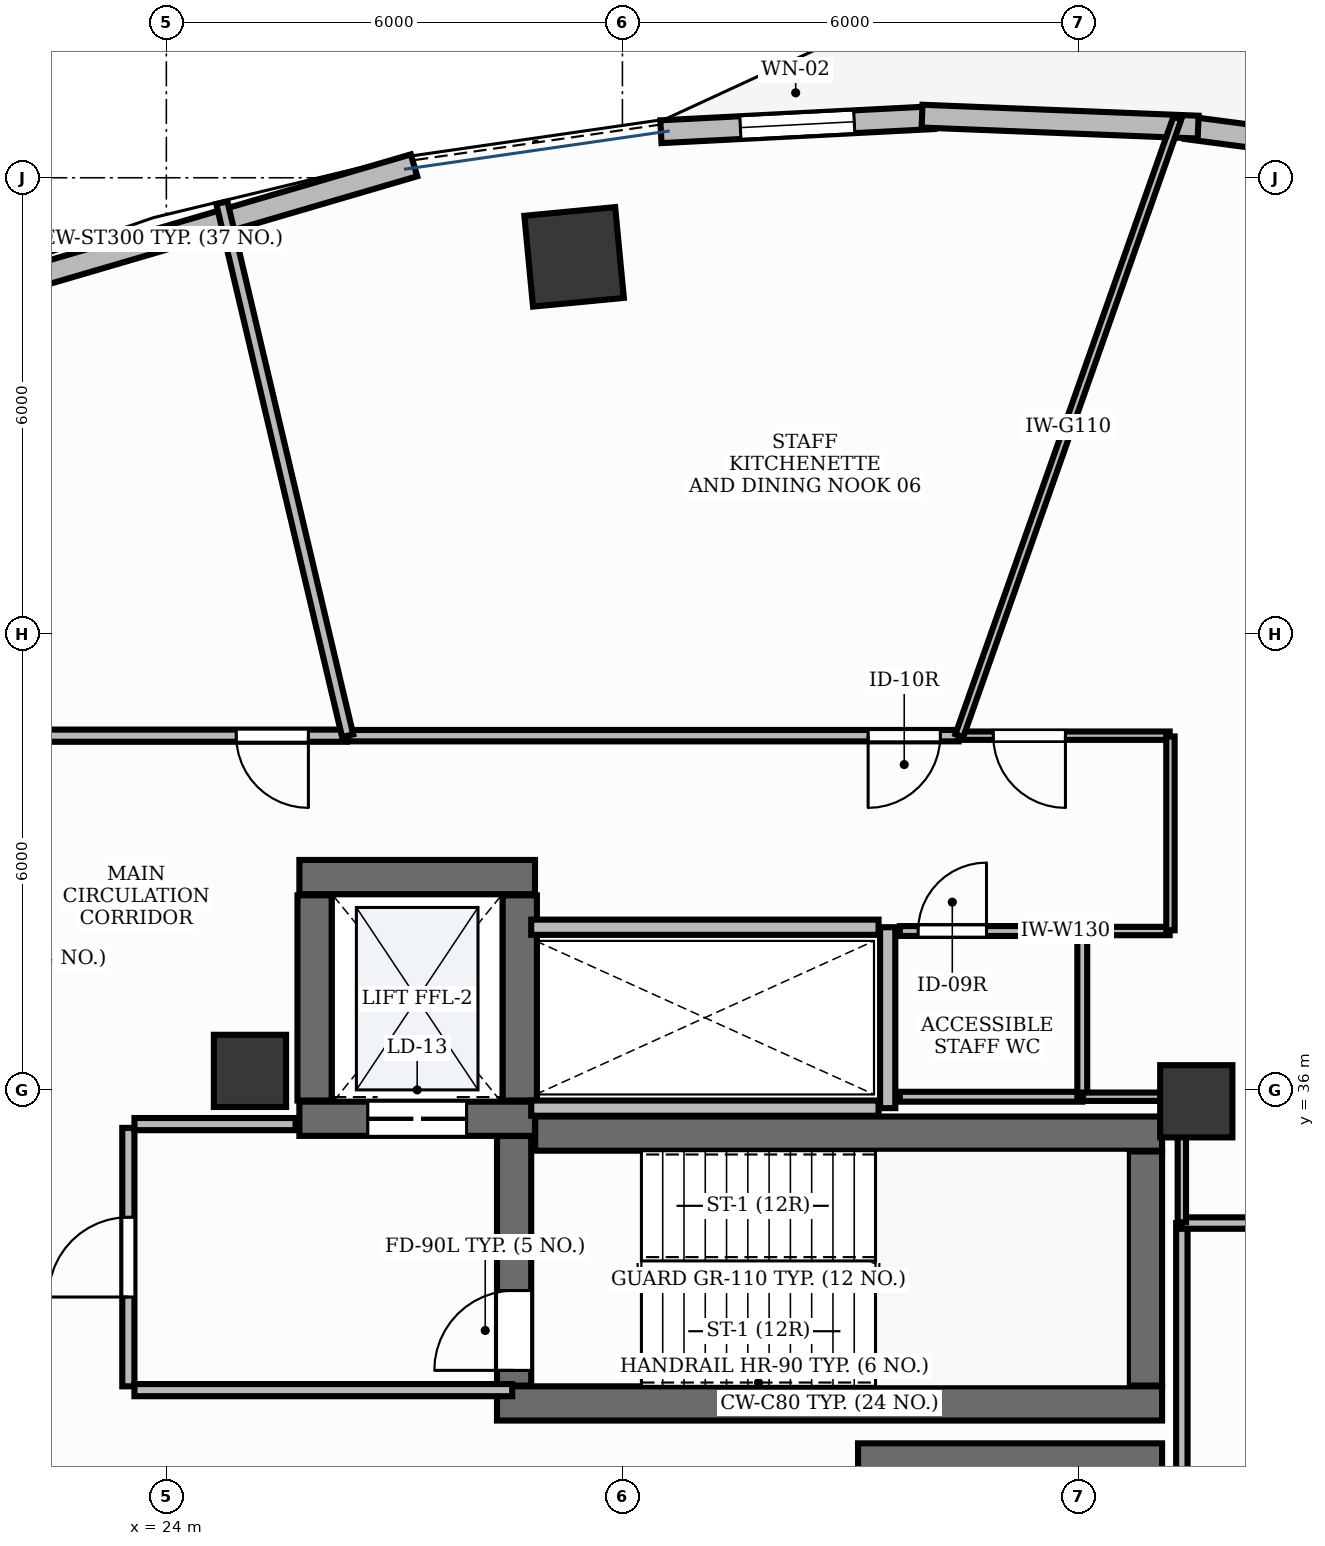
"""IFC4 building model, lengths in metres.
Left out: names, types, materials, properties, quantities, classifications, styles, units other than length and angle.
Written with IfcOpenShell. Run it as: python <this file> out.ifc"""

import sys

from ifc_helpers import new_model, si_unit, direction, frame, frame_2d, origin, origin_2d, place, context, subcontext, project, spatial, rectangle, extrude, element, fill, save


model = new_model("IFC4")
c1 = context("Model", 3, precision=1e-05, world=origin(), true_north=direction((0.0, 1.0)))
c2 = subcontext(c1, "Body", "Model", "MODEL_VIEW")
j1 = project(units=[si_unit("LENGTHUNIT", "METRE"), si_unit("PLANEANGLEUNIT", "RADIAN")], contexts=[c1])
p1 = place(None, origin())
s1 = spatial("IfcSite", under=j1, at=p1, CompositionType="ELEMENT")
p2 = place(p1, origin())
s2 = spatial("IfcBuilding", under=s1, at=p2, CompositionType="ELEMENT")
p3 = place(p2, frame((0.0, 0.0, 132.0)))
s3 = spatial("IfcBuildingStorey", under=s2, at=p3, CompositionType="ELEMENT", Elevation=132.0)
p4 = place(p3, frame((28.852, 35.425, 0.0), z_axis=(0.0, 0.0, 1.0), x_axis=(1.0, 0.0, 0.0)))
e1 = element("IfcWall", 1, at=p4, inside=s3, PredefinedType="SHEAR", context=c2, shape_type="SweptSolid", body=[
    extrude(rectangle(XDim=8.248, YDim=0.45, at=frame_2d((4.124, 0.0))), origin(), (0.0, 0.0, 1.0), 3.9),
])
p5 = place(p3, frame((28.35, 31.875, 0.0), z_axis=(0.0, 0.0, 1.0), x_axis=(1.0, 0.0, 0.0)))
e2 = element("IfcWall", 2, at=p5, inside=s3, PredefinedType="SHEAR", context=c2, shape_type="SweptSolid", body=[
    extrude(rectangle(XDim=8.75, YDim=0.45, at=frame_2d((4.375, 0.0))), origin(), (0.0, 0.0, 1.0), 3.9),
])
p6 = place(p3, frame((36.875, 32.11, 0.0), z_axis=(0.0, 0.0, 1.0), x_axis=(0.0, 1.0, 0.0)))
e3 = element("IfcWall", 3, at=p6, inside=s3, PredefinedType="SHEAR", context=c2, shape_type="SweptSolid", body=[
    extrude(rectangle(XDim=3.08, YDim=0.45, at=frame_2d((1.54, 0.0))), origin(), (0.0, 0.0, 1.0), 3.9),
])
p7 = place(p3, frame((28.575, 32.11, 0.0), z_axis=(0.0, 0.0, 1.0), x_axis=(0.0, 1.0, 0.0)))
e4 = element("IfcWall", 4, at=p7, inside=s3, PredefinedType="SHEAR", context=c2, shape_type="SweptSolid", body=[
    extrude(rectangle(XDim=3.283, YDim=0.45, at=frame_2d((1.642, 0.0))), origin(), (0.0, 0.0, 1.0), 3.9),
])
p8 = place(p7, frame((0.2, 0.0, 0.0)))
e5 = element("IfcOpeningElement", 5, at=p8, cuts=e4, PredefinedType="OPENING", context=c2, shape_type="SweptSolid", body=[
    extrude(rectangle(XDim=1.05, YDim=2.15, at=frame_2d((0.525, 1.075))), frame((0.0, 0.24, 0.0), z_axis=(0.0, -1.0, 0.0), x_axis=(1.0, 0.0, 0.0)), (0.0, 0.0, 1.0), 0.48),
])
p9 = place(p3, frame((33.1, 31.125, 0.0), z_axis=(0.0, 0.0, 1.0), x_axis=(1.0, 0.0, 0.0)))
e6 = element("IfcWall", 6, at=p9, inside=s3, PredefinedType="SHEAR", context=c2, shape_type="SweptSolid", body=[
    extrude(rectangle(XDim=4.0, YDim=0.45, at=frame_2d((2.0, 0.0))), origin(), (0.0, 0.0, 1.0), 3.9),
])
p10 = place(p3, frame((25.75, 38.8, 0.0), z_axis=(0.0, 0.0, 1.0), x_axis=(1.0, 0.0, 0.0)))
e7 = element("IfcWall", 7, at=p10, inside=s3, PredefinedType="SHEAR", context=c2, shape_type="SweptSolid", body=[
    extrude(rectangle(XDim=3.1, YDim=0.45, at=frame_2d((1.55, 0.0))), origin(), (0.0, 0.0, 1.0), 3.9),
])
p11 = place(p3, frame((25.75, 35.62, 0.0), z_axis=(0.0, 0.0, 1.0), x_axis=(1.0, 0.0, 0.0)))
e8 = element("IfcWall", 8, at=p11, inside=s3, PredefinedType="SHEAR", context=c2, shape_type="SweptSolid", body=[
    extrude(rectangle(XDim=3.1, YDim=0.45, at=frame_2d((1.55, 0.0))), origin(), (0.0, 0.0, 1.0), 3.9),
])
p12 = place(p11, frame((0.9, 0.0, 0.0)))
e9 = element("IfcOpeningElement", 9, at=p12, cuts=e8, PredefinedType="OPENING", context=c2, shape_type="SweptSolid", body=[
    extrude(rectangle(XDim=1.3, YDim=2.2, at=frame_2d((0.65, 1.1))), frame((0.0, 0.24, 0.0), z_axis=(0.0, -1.0, 0.0), x_axis=(1.0, 0.0, 0.0)), (0.0, 0.0, 1.0), 0.48),
])
for number, where, z_axis, x_axis in (
    (10, (25.95, 35.86, 0.0), (0.0, 0.0, 1.0), (0.0, 1.0, 0.0)),
    (11, (28.65, 35.86, 0.0), (0.0, 0.0, 1.0), (0.0, 1.0, 0.0)),
):
    element("IfcWall", number, at=place(p3, frame(where, z_axis=z_axis, x_axis=x_axis)), inside=s3, PredefinedType="SHEAR", context=c2, shape_type="SweptSolid", body=[
        extrude(rectangle(XDim=2.7, YDim=0.45, at=frame_2d((1.35, 0.0))), origin(), (0.0, 0.0, 1.0), 3.9),
    ])
for number, where, z_axis, x_axis in (
    (12, (37.55, 35.85, -0.0), (0.0, 0.0, 1.0), (1.0, 0.0, 0.0)),
    (13, (25.1, 36.25, -0.0), (0.0, 0.0, 1.0), (1.0, 0.0, 0.0)),
):
    element("IfcColumn", number, at=place(p3, frame(where, z_axis=z_axis, x_axis=x_axis)), inside=s3, PredefinedType="PILASTER", context=c2, shape_type="SweptSolid", body=[
        extrude(rectangle(XDim=0.95, YDim=0.95, at=origin_2d()), origin(), (0.0, 0.0, 1.0), 3.901),
    ])
p13 = place(p3, frame((29.364, 46.959, -0.0), z_axis=(0.0, 0.0, 1.0), x_axis=(0.995462868748, 0.095150811579, 0.0)))
e14 = element("IfcColumn", 14, at=p13, inside=s3, PredefinedType="COLUMN", context=c2, shape_type="SweptSolid", body=[
    extrude(rectangle(XDim=1.2, YDim=1.2, at=origin_2d()), origin(), (0.0, 0.0, 1.0), 3.901),
])
p14 = place(p3, frame((40.964, 48.19, 0.0), z_axis=(0.0, 0.0, 1.0), x_axis=(-0.991369257822, 0.131099178664, 0.0)))
e15 = element("IfcWall", 15, at=p14, inside=s3, PredefinedType="STANDARD", context=c2, shape_type="SweptSolid", body=[
    extrude(rectangle(XDim=3.575, YDim=0.3, at=frame_2d((1.788, 0.0))), origin(), (0.0, 0.0, 1.0), 3.9),
])
p15 = place(p14, frame((1.238, 0.0, 0.0)))
e16 = element("IfcOpeningElement", 16, at=p15, cuts=e15, PredefinedType="OPENING", context=c2, shape_type="SweptSolid", body=[
    extrude(rectangle(XDim=1.1, YDim=2.15, at=frame_2d((0.55, 1.075))), frame((0.0, 0.165, 0.0), z_axis=(0.0, -1.0, 0.0), x_axis=(1.0, 0.0, 0.0)), (0.0, 0.0, 1.0), 0.33),
])
p16 = place(p3, frame((34.096, 48.791, 0.0), z_axis=(0.0, 0.0, 1.0), x_axis=(-0.998676861232, -0.051424963197, 0.0)))
e17 = element("IfcWall", 17, at=p16, inside=s3, PredefinedType="STANDARD", context=c2, shape_type="SweptSolid", body=[
    extrude(rectangle(XDim=3.594, YDim=0.3, at=frame_2d((1.797, 0.0))), origin(), (0.0, 0.0, 1.0), 3.9),
])
p17 = place(p16, frame((1.047, 0.0, 0.95)))
e18 = element("IfcOpeningElement", 18, at=p17, cuts=e17, PredefinedType="OPENING", context=c2, shape_type="SweptSolid", body=[
    extrude(rectangle(XDim=1.5, YDim=1.8, at=frame_2d((0.75, 0.9))), frame((0.0, 0.165, 0.0), z_axis=(0.0, -1.0, 0.0), x_axis=(1.0, 0.0, 0.0)), (0.0, 0.0, 1.0), 0.33),
])
p18 = place(p3, frame((37.574, 48.666, 0.0), z_axis=(0.0, 0.0, 1.0), x_axis=(-0.999212076676, 0.039689114679, 0.0)))
e19 = element("IfcWall", 19, at=p18, inside=s3, PredefinedType="STANDARD", context=c2, shape_type="SweptSolid", body=[
    extrude(rectangle(XDim=3.635, YDim=0.3, at=frame_2d((1.818, 0.0))), origin(), (0.0, 0.0, 1.0), 3.9),
])
p19 = place(p3, frame((27.259, 48.163, 0.0), z_axis=(0.0, 0.0, 1.0), x_axis=(-0.959706958999, -0.281002763064, 0.0)))
e20 = element("IfcWall", 20, at=p19, inside=s3, PredefinedType="STANDARD", context=c2, shape_type="SweptSolid", body=[
    extrude(rectangle(XDim=6.908, YDim=0.3, at=frame_2d((3.454, 0.0))), origin(), (0.0, 0.0, 1.0), 3.47),
])
p20 = place(p3, frame((33.49, 35.76, 0.0), z_axis=(0.0, 0.0, 1.0), x_axis=(0.0, 1.0, 0.0)))
e21 = element("IfcWall", 21, at=p20, inside=s3, PredefinedType="PARTITIONING", context=c2, shape_type="SweptSolid", body=[
    extrude(rectangle(XDim=2.38, YDim=0.2, at=frame_2d((1.19, 0.0))), origin(), (0.0, 0.0, 1.0), 2.91),
])
for number, where, z_axis, x_axis in (
    (22, (28.8, 35.76, 0.0), (0.0, 0.0, 1.0), (1.0, 0.0, 0.0)),
    (23, (28.8, 38.14, 0.0), (0.0, 0.0, 1.0), (1.0, 0.0, 0.0)),
):
    element("IfcWall", number, at=place(p3, frame(where, z_axis=z_axis, x_axis=x_axis)), inside=s3, PredefinedType="PARTITIONING", context=c2, shape_type="SweptSolid", body=[
        extrude(rectangle(XDim=4.57, YDim=0.2, at=frame_2d((2.285, 0.0))), origin(), (0.0, 0.0, 1.0), 2.91),
    ])
p21 = place(p3, frame((23.5, 32.1, 0.0), z_axis=(0.0, 0.0, 1.0), x_axis=(0.0, 1.0, 0.0)))
e24 = element("IfcWall", 24, at=p21, inside=s3, PredefinedType="PARTITIONING", context=c2, shape_type="SweptSolid", body=[
    extrude(rectangle(XDim=3.4, YDim=0.16, at=frame_2d((1.7, 0.0))), origin(), (0.0, 0.0, 1.0), 2.91),
])
p22 = place(p21, frame((1.175, 0.0, 0.0)))
e25 = element("IfcOpeningElement", 25, at=p22, cuts=e24, PredefinedType="OPENING", context=c2, shape_type="SweptSolid", body=[
    extrude(rectangle(XDim=1.05, YDim=2.15, at=frame_2d((0.525, 1.075))), frame((0.0, 0.095, 0.0), z_axis=(0.0, -1.0, 0.0), x_axis=(1.0, 0.0, 0.0)), (0.0, 0.0, 1.0), 0.19),
])
p23 = place(p3, frame((23.58, 32.05, 0.0), z_axis=(0.0, 0.0, 1.0), x_axis=(1.0, 0.0, 0.0)))
e26 = element("IfcWall", 26, at=p23, inside=s3, PredefinedType="PARTITIONING", context=c2, shape_type="SweptSolid", body=[
    extrude(rectangle(XDim=4.97, YDim=0.16, at=frame_2d((2.485, 0.0))), origin(), (0.0, 0.0, 1.0), 2.91),
])
p24 = place(p3, frame((23.58, 35.55, 0.0), z_axis=(0.0, 0.0, 1.0), x_axis=(1.0, 0.0, 0.0)))
e27 = element("IfcWall", 27, at=p24, inside=s3, PredefinedType="PARTITIONING", context=c2, shape_type="SweptSolid", body=[
    extrude(rectangle(XDim=2.12, YDim=0.16, at=frame_2d((1.06, 0.0))), origin(), (0.0, 0.0, 1.0), 2.91),
])
p25 = place(p3, frame((33.65, 38.09, 0.0), z_axis=(0.0, 0.0, 1.0), x_axis=(1.0, 0.0, 0.0)))
e28 = element("IfcWall", 28, at=p25, inside=s3, PredefinedType="PARTITIONING", context=c2, shape_type="SweptSolid", body=[
    extrude(rectangle(XDim=2.4, YDim=0.13, at=frame_2d((1.2, 0.0))), origin(), (0.0, 0.0, 1.0), 2.91),
])
p26 = place(p25, frame((0.24, 0.0, 0.0)))
e29 = element("IfcOpeningElement", 29, at=p26, cuts=e28, PredefinedType="OPENING", context=c2, shape_type="SweptSolid", body=[
    extrude(rectangle(XDim=0.9, YDim=2.15, at=frame_2d((0.45, 1.075))), frame((0.0, 0.08, 0.0), z_axis=(0.0, -1.0, 0.0), x_axis=(1.0, 0.0, 0.0)), (0.0, 0.0, 1.0), 0.16),
])
p27 = place(p3, frame((37.2, 40.66, 0.0), z_axis=(0.0, 0.0, 1.0), x_axis=(-1.0, 0.0, 0.0)))
e30 = element("IfcWall", 30, at=p27, inside=s3, PredefinedType="MOVABLE", context=c2, shape_type="SweptSolid", body=[
    extrude(rectangle(XDim=2.767, YDim=0.11, at=frame_2d((1.384, 0.0))), origin(), (0.0, 0.0, 1.0), 2.91),
])
p28 = place(p27, frame((1.372, 0.0, 0.0)))
e31 = element("IfcOpeningElement", 31, at=p28, cuts=e30, PredefinedType="OPENING", context=c2, shape_type="SweptSolid", body=[
    extrude(rectangle(XDim=0.95, YDim=2.15, at=frame_2d((0.475, 1.075))), frame((0.0, 0.07, 0.0), z_axis=(0.0, -1.0, 0.0), x_axis=(1.0, 0.0, 0.0)), (0.0, 0.0, 1.0), 0.14),
])
p29 = place(p3, frame((34.423, 40.66, 0.0), z_axis=(0.0, 0.0, 1.0), x_axis=(-1.0, 0.0, 0.0)))
e32 = element("IfcWall", 32, at=p29, inside=s3, PredefinedType="PARTITIONING", context=c2, shape_type="SweptSolid", body=[
    extrude(rectangle(XDim=8.037, YDim=0.15, at=frame_2d((4.019, 0.0))), origin(), (0.0, 0.0, 1.0), 2.91),
])
p30 = place(p29, frame((0.24, 0.0, 0.0)))
e33 = element("IfcOpeningElement", 33, at=p30, cuts=e32, PredefinedType="OPENING", context=c2, shape_type="SweptSolid", body=[
    extrude(rectangle(XDim=0.95, YDim=2.15, at=frame_2d((0.475, 1.075))), frame((0.0, 0.09, 0.0), z_axis=(0.0, -1.0, 0.0), x_axis=(1.0, 0.0, 0.0)), (0.0, 0.0, 1.0), 0.18),
])
p31 = place(p3, frame((26.375, 40.66, 0.0), z_axis=(0.0, 0.0, 1.0), x_axis=(-1.0, 0.0, 0.0)))
e34 = element("IfcWall", 34, at=p31, inside=s3, PredefinedType="PARTITIONING", context=c2, shape_type="SweptSolid", body=[
    extrude(rectangle(XDim=4.625, YDim=0.16, at=frame_2d((2.312, 0.0))), origin(), (0.0, 0.0, 1.0), 2.91),
])
p32 = place(p31, frame((0.506, 0.0, 0.0)))
e35 = element("IfcOpeningElement", 35, at=p32, cuts=e34, PredefinedType="OPENING", context=c2, shape_type="SweptSolid", body=[
    extrude(rectangle(XDim=0.95, YDim=2.15, at=frame_2d((0.475, 1.075))), frame((0.0, 0.095, 0.0), z_axis=(0.0, -1.0, 0.0), x_axis=(1.0, 0.0, 0.0)), (0.0, 0.0, 1.0), 0.19),
])
p33 = place(p3, frame((36.05, 35.91, 0.0), z_axis=(0.0, 0.0, 1.0), x_axis=(-1.0, 0.0, 0.0)))
e36 = element("IfcWall", 36, at=p33, inside=s3, PredefinedType="PARTITIONING", context=c2, shape_type="SweptSolid", body=[
    extrude(rectangle(XDim=2.4, YDim=0.13, at=frame_2d((1.2, 0.0))), origin(), (0.0, 0.0, 1.0), 2.91),
])
p34 = place(p3, frame((36.05, 38.09, 0.0), z_axis=(0.0, 0.0, 1.0), x_axis=(0.0, -1.0, 0.0)))
e37 = element("IfcWall", 37, at=p34, inside=s3, PredefinedType="PARTITIONING", context=c2, shape_type="SweptSolid", body=[
    extrude(rectangle(XDim=2.18, YDim=0.13, at=frame_2d((1.09, 0.0))), origin(), (0.0, 0.0, 1.0), 2.91),
])
p35 = place(p3, frame((37.36, 18.1, 0.0), z_axis=(0.0, 0.0, 1.0), x_axis=(0.0, 1.0, 0.0)))
e38 = element("IfcWall", 38, at=p35, inside=s3, PredefinedType="PARTITIONING", context=c2, shape_type="SweptSolid", body=[
    extrude(rectangle(XDim=16.148, YDim=0.15, at=frame_2d((8.074, 0.0))), origin(), (0.0, 0.0, 1.0), 2.91),
])
p36 = place(p3, frame((37.36, 34.248, 0.0), z_axis=(0.0, 0.0, 1.0), x_axis=(1.0, 0.0, 0.0)))
e39 = element("IfcWall", 39, at=p36, inside=s3, PredefinedType="PARTITIONING", context=c2, shape_type="SweptSolid", body=[
    extrude(rectangle(XDim=3.938, YDim=0.15, at=frame_2d((1.969, 0.0))), origin(), (0.0, 0.0, 1.0), 2.91),
])
p37 = place(p3, frame((37.36, 34.258, 0.0), z_axis=(0.0, 0.0, 1.0), x_axis=(0.0, 1.0, 0.0)))
e40 = element("IfcWall", 40, at=p37, inside=s3, PredefinedType="MOVABLE", context=c2, shape_type="SweptSolid", body=[
    extrude(rectangle(XDim=1.642, YDim=0.11, at=frame_2d((0.821, 0.0))), origin(), (0.0, 0.0, 1.0), 2.91),
])
p38 = place(p3, frame((37.35, 35.91, 0.0), z_axis=(0.0, 0.0, 1.0), x_axis=(-1.0, 0.0, 0.0)))
e41 = element("IfcWall", 41, at=p38, inside=s3, PredefinedType="MOVABLE", context=c2, shape_type="SweptSolid", body=[
    extrude(rectangle(XDim=1.29, YDim=0.11, at=frame_2d((0.645, 0.0))), origin(), (0.0, 0.0, 1.0), 2.91),
])
p39 = place(p3, frame((36.06, 38.09, 0.0), z_axis=(0.0, 0.0, 1.0), x_axis=(1.0, 0.0, 0.0)))
e42 = element("IfcWall", 42, at=p39, inside=s3, PredefinedType="MOVABLE", context=c2, shape_type="SweptSolid", body=[
    extrude(rectangle(XDim=1.14, YDim=0.11, at=frame_2d((0.57, 0.0))), origin(), (0.0, 0.0, 1.0), 2.91),
])
p40 = place(p3, frame((37.21, 38.1, 0.0), z_axis=(0.0, 0.0, 1.0), x_axis=(0.0, 1.0, 0.0)))
e43 = element("IfcWall", 43, at=p40, inside=s3, PredefinedType="MOVABLE", context=c2, shape_type="SweptSolid", body=[
    extrude(rectangle(XDim=2.55, YDim=0.11, at=frame_2d((1.275, 0.0))), origin(), (0.0, 0.0, 1.0), 2.91),
])
p41 = place(p3, frame((34.433, 40.66, 0.0), z_axis=(0.0, 0.0, 1.0), x_axis=(0.332889773539, 0.942965746288, 0.0)))
e44 = element("IfcWall", 44, at=p41, inside=s3, PredefinedType="MOVABLE", context=c2, shape_type="SweptSolid", body=[
    extrude(rectangle(XDim=8.617, YDim=0.11, at=frame_2d((4.308, 0.0))), origin(), (0.0, 0.0, 1.0), 2.91),
])
p42 = place(p3, frame((26.385, 40.66, 0.0), z_axis=(0.0, 0.0, 1.0), x_axis=(-0.229741864883, 0.97325159929, 0.0)))
e45 = element("IfcWall", 45, at=p42, inside=s3, PredefinedType="PARTITIONING", context=c2, shape_type="SweptSolid", body=[
    extrude(rectangle(XDim=7.205, YDim=0.15, at=frame_2d((3.603, 0.0))), origin(), (0.0, 0.0, 1.0), 2.91),
])
p43 = place(p17, origin())
e46 = element("IfcWindow", 46, at=p43, inside=s3, PartitioningType="DOUBLE_PANEL_VERTICAL", PredefinedType="WINDOW", context=c2, shape_type="SweptSolid", body=[
    extrude(rectangle(XDim=1.5, YDim=1.8, at=frame_2d((0.75, 0.9))), frame((0.0, 0.03, 0.0), z_axis=(0.0, -1.0, 0.0), x_axis=(1.0, 0.0, 0.0)), (0.0, 0.0, 1.0), 0.06),
])
fill(e18, e46)
p44 = place(p8, origin())
e47 = element("IfcDoor", 47, at=p44, inside=s3, OperationType="SINGLE_SWING_LEFT", PredefinedType="DOOR", context=c2, shape_type="SweptSolid", body=[
    extrude(rectangle(XDim=1.05, YDim=2.15, at=frame_2d((0.525, 1.075))), frame((0.0, 0.025, 0.0), z_axis=(0.0, -1.0, 0.0), x_axis=(1.0, 0.0, 0.0)), (0.0, 0.0, 1.0), 0.05),
])
fill(e5, e47)
p45 = place(p12, origin())
e48 = element("IfcDoor", 48, at=p45, inside=s3, OperationType="DOUBLE_DOOR_SLIDING", PredefinedType="DOOR", context=c2, shape_type="SweptSolid", body=[
    extrude(rectangle(XDim=1.3, YDim=2.2, at=frame_2d((0.65, 1.1))), frame((0.0, 0.025, 0.0), z_axis=(0.0, -1.0, 0.0), x_axis=(1.0, 0.0, 0.0)), (0.0, 0.0, 1.0), 0.05),
])
fill(e9, e48)
p46 = place(p22, origin())
e49 = element("IfcDoor", 49, at=p46, inside=s3, OperationType="SINGLE_SWING_LEFT", PredefinedType="DOOR", context=c2, shape_type="SweptSolid", body=[
    extrude(rectangle(XDim=1.05, YDim=2.15, at=frame_2d((0.525, 1.075))), frame((0.0, 0.025, 0.0), z_axis=(0.0, -1.0, 0.0), x_axis=(1.0, 0.0, 0.0)), (0.0, 0.0, 1.0), 0.05),
])
fill(e25, e49)
p47 = place(p26, origin())
e50 = element("IfcDoor", 50, at=p47, inside=s3, OperationType="SINGLE_SWING_RIGHT", PredefinedType="DOOR", context=c2, shape_type="SweptSolid", body=[
    extrude(rectangle(XDim=0.9, YDim=2.15, at=frame_2d((0.45, 1.075))), frame((0.0, 0.025, 0.0), z_axis=(0.0, -1.0, 0.0), x_axis=(1.0, 0.0, 0.0)), (0.0, 0.0, 1.0), 0.05),
])
fill(e29, e50)
p48 = place(p28, origin())
e51 = element("IfcDoor", 51, at=p48, inside=s3, OperationType="SINGLE_SWING_LEFT", PredefinedType="DOOR", context=c2, shape_type="SweptSolid", body=[
    extrude(rectangle(XDim=0.95, YDim=2.15, at=frame_2d((0.475, 1.075))), frame((0.0, 0.025, 0.0), z_axis=(0.0, -1.0, 0.0), x_axis=(1.0, 0.0, 0.0)), (0.0, 0.0, 1.0), 0.05),
])
fill(e31, e51)
p49 = place(p30, origin())
e52 = element("IfcDoor", 52, at=p49, inside=s3, OperationType="SINGLE_SWING_RIGHT", PredefinedType="DOOR", context=c2, shape_type="SweptSolid", body=[
    extrude(rectangle(XDim=0.95, YDim=2.15, at=frame_2d((0.475, 1.075))), frame((0.0, 0.025, 0.0), z_axis=(0.0, -1.0, 0.0), x_axis=(1.0, 0.0, 0.0)), (0.0, 0.0, 1.0), 0.05),
])
fill(e33, e52)
p50 = place(p32, origin())
e53 = element("IfcDoor", 53, at=p50, inside=s3, OperationType="SINGLE_SWING_LEFT", PredefinedType="DOOR", context=c2, shape_type="SweptSolid", body=[
    extrude(rectangle(XDim=0.95, YDim=2.15, at=frame_2d((0.475, 1.075))), frame((0.0, 0.025, 0.0), z_axis=(0.0, -1.0, 0.0), x_axis=(1.0, 0.0, 0.0)), (0.0, 0.0, 1.0), 0.05),
])
fill(e35, e53)
save(model, sys.argv[1])
